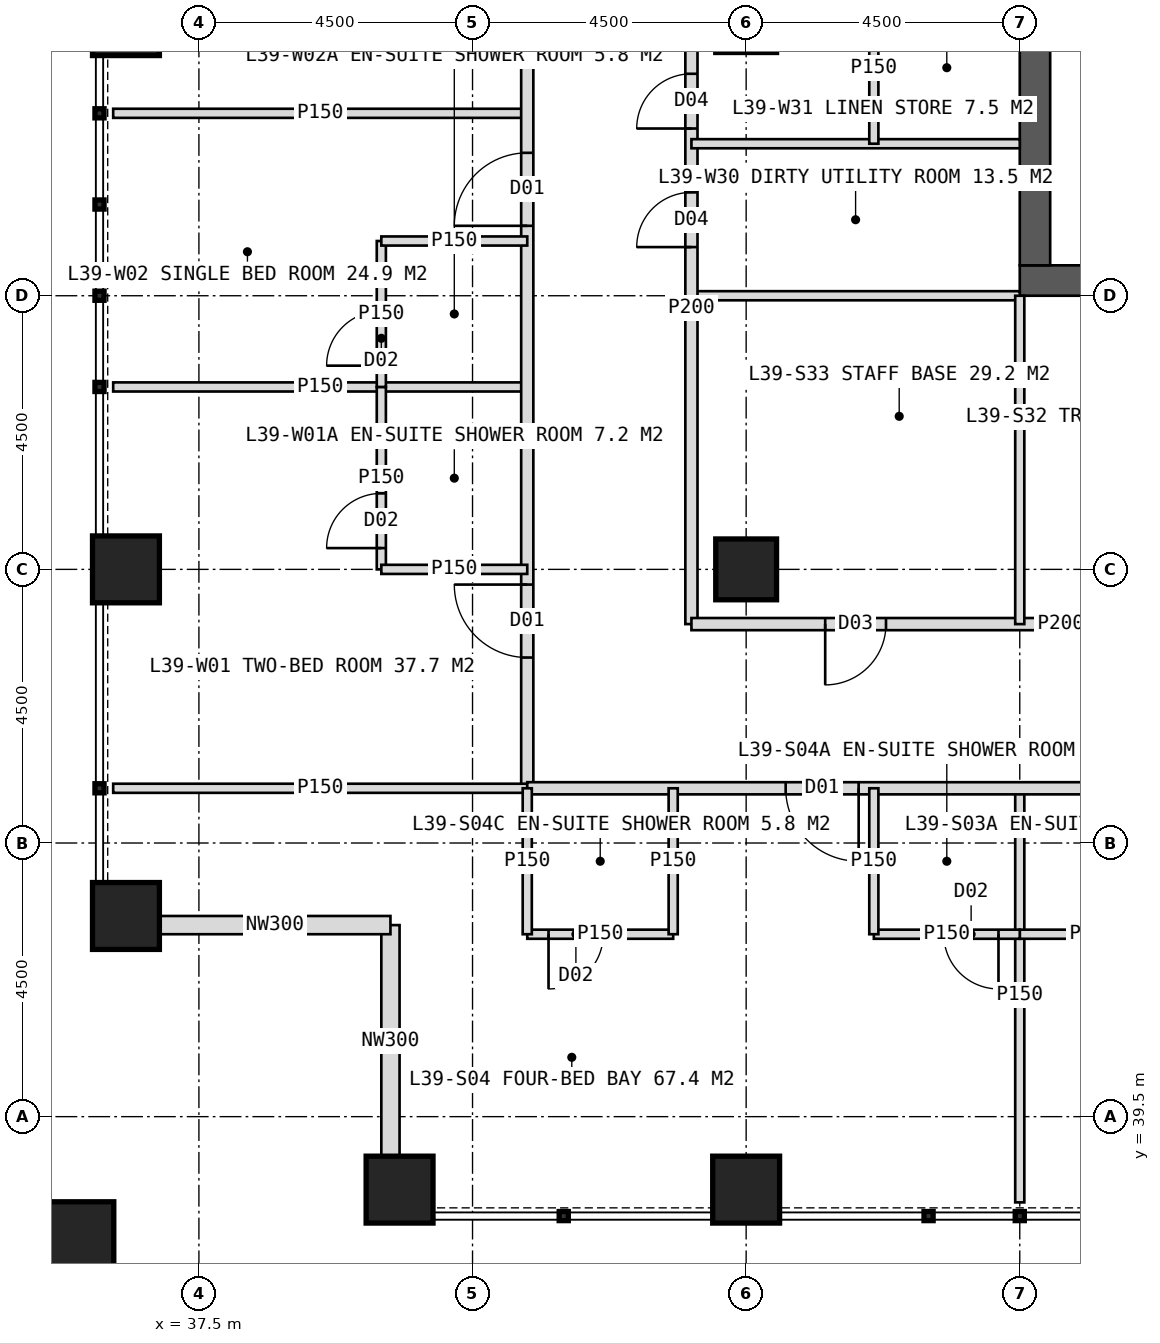
"""IFC4 building model, lengths in metres.
Left out: names, types, materials, properties, quantities, classifications, styles, units other than length and angle.
Written with IfcOpenShell. Run it as: python <this file> out.ifc"""

import sys

from ifc_helpers import new_model, si_unit, direction, frame, frame_2d, origin, origin_2d, place, context, subcontext, project, spatial, rectangle, hollow_rectangle, extrude, element, fill, save


model = new_model("IFC4")
c1 = context("Model", 3, precision=1e-05, world=origin(), true_north=direction((0.0, 1.0)))
c2 = subcontext(c1, "Body", "Model", "MODEL_VIEW")
j1 = project(units=[si_unit("LENGTHUNIT", "METRE"), si_unit("PLANEANGLEUNIT", "RADIAN")], contexts=[c1])
p1 = place(None, origin())
s1 = spatial("IfcSite", under=j1, at=p1, CompositionType="ELEMENT")
p2 = place(p1, origin())
s2 = spatial("IfcBuilding", under=s1, at=p2, CompositionType="ELEMENT")
p3 = place(p2, frame((0.0, 0.0, 164.0)))
s3 = spatial("IfcBuildingStorey", under=s2, at=p3, CompositionType="ELEMENT", Elevation=164.0)
p4 = place(p3, frame((51.0, 53.25, 0.0), z_axis=(0.0, 0.0, 1.0), x_axis=(1.0, 0.0, 0.0)))
e1 = element("IfcWall", 1, at=p4, inside=s3, PredefinedType="SHEAR", context=c2, shape_type="SweptSolid", body=[
    extrude(rectangle(XDim=18.0, YDim=0.5, at=frame_2d((9.0, 0.0))), origin(), (0.0, 0.0, 1.0), 4.0),
])
p5 = place(p4, frame((8.1, 0.0, 0.0)))
e2 = element("IfcOpeningElement", 2, at=p5, cuts=e1, PredefinedType="OPENING", context=c2, shape_type="SweptSolid", body=[
    extrude(rectangle(XDim=1.8, YDim=2.2, at=frame_2d((0.9, 1.1))), frame((0.0, 0.26, 0.0), z_axis=(0.0, -1.0, 0.0), x_axis=(1.0, 0.0, 0.0)), (0.0, 0.0, 1.0), 0.52),
])
p6 = place(p3, frame((51.25, 53.5, 0.0), z_axis=(0.0, 0.0, 1.0), x_axis=(0.0, 1.0, 0.0)))
e3 = element("IfcWall", 3, at=p6, inside=s3, PredefinedType="SHEAR", context=c2, shape_type="SweptSolid", body=[
    extrude(rectangle(XDim=17.0, YDim=0.5, at=frame_2d((8.5, 0.0))), origin(), (0.0, 0.0, 1.0), 4.0),
])
p7 = place(p6, frame((6.0, 0.0, 0.0)))
e4 = element("IfcOpeningElement", 4, at=p7, cuts=e3, PredefinedType="OPENING", context=c2, shape_type="SweptSolid", body=[
    extrude(rectangle(XDim=1.5, YDim=2.2, at=frame_2d((0.75, 1.1))), frame((0.0, 0.26, 0.0), z_axis=(0.0, -1.0, 0.0), x_axis=(1.0, 0.0, 0.0)), (0.0, 0.0, 1.0), 0.52),
])
p8 = place(p3, frame((46.5, 48.5, 0.0), z_axis=(0.0, 0.0, 1.0), x_axis=(1.0, 0.0, 0.0)))
e5 = element("IfcColumn", 5, at=p8, inside=s3, PredefinedType="COLUMN", context=c2, shape_type="SweptSolid", body=[
    extrude(hollow_rectangle(XDim=1.0, YDim=1.0, WallThickness=0.1, at=origin_2d()), origin(), (0.0, 0.0, 1.0), 4.0),
])
for number, where, z_axis, x_axis in (
    (6, (40.8, 38.3, 0.0), (0.0, 0.0, 1.0), (1.0, 0.0, 0.0)),
    (7, (36.3, 42.8, 0.0), (0.0, 0.0, 1.0), (1.0, 0.0, 0.0)),
    (8, (46.5, 38.3, 0.0), (0.0, 0.0, 1.0), (1.0, 0.0, 0.0)),
    (9, (36.3, 48.5, 0.0), (0.0, 0.0, 1.0), (1.0, 0.0, 0.0)),
    (10, (36.3, 57.5, 0.0), (0.0, 0.0, 1.0), (1.0, 0.0, 0.0)),
):
    element("IfcColumn", number, at=place(p3, frame(where, z_axis=z_axis, x_axis=x_axis)), inside=s3, PredefinedType="COLUMN", context=c2, shape_type="SweptSolid", body=[
        extrude(hollow_rectangle(XDim=1.1, YDim=1.1, WallThickness=0.1, at=origin_2d()), origin(), (0.0, 0.0, 1.0), 4.0),
    ])
p9 = place(p3, frame((35.4, 37.4, 0.0), z_axis=(0.0, 0.0, 1.0), x_axis=(1.0, 0.0, 0.0)))
e11 = element("IfcColumn", 11, at=p9, inside=s3, PredefinedType="COLUMN", context=c2, shape_type="SweptSolid", body=[
    extrude(hollow_rectangle(XDim=1.4, YDim=1.4, WallThickness=0.08, at=origin_2d()), origin(), (0.0, 0.0, 1.0), 4.0),
])
for number, where, z_axis, x_axis in (
    (12, (40.65, 38.85, 0.0), (0.0, 0.0, 1.0), (0.0, 1.0, 0.0)),
    (13, (40.65, 42.65, 0.0), (0.0, 0.0, 1.0), (-1.0, 0.0, 0.0)),
):
    element("IfcWall", number, at=place(p3, frame(where, z_axis=z_axis, x_axis=x_axis)), inside=s3, PredefinedType="ELEMENTEDWALL", context=c2, shape_type="SweptSolid", body=[
        extrude(rectangle(XDim=3.8, YDim=0.3, at=frame_2d((1.9, 0.0))), origin(), (0.0, 0.0, 1.0), 4.0),
    ])
for number, where, z_axis, x_axis in (
    (14, (42.9, 51.5, 0.0), (0.0, 0.0, 1.0), (-1.0, 0.0, 0.0)),
    (15, (42.9, 56.0, 0.0), (0.0, 0.0, 1.0), (-1.0, 0.0, 0.0)),
):
    element("IfcWall", number, at=place(p3, frame(where, z_axis=z_axis, x_axis=x_axis)), inside=s3, PredefinedType="PARTITIONING", context=c2, shape_type="SweptSolid", body=[
        extrude(rectangle(XDim=6.81, YDim=0.15, at=frame_2d((3.405, 0.0))), origin(), (0.0, 0.0, 1.0), 3.75),
    ])
p10 = place(p3, frame((42.9, 44.9, 0.0), z_axis=(0.0, 0.0, 1.0), x_axis=(0.0, 1.0, 0.0)))
e16 = element("IfcWall", 16, at=p10, inside=s3, PredefinedType="PARTITIONING", context=c2, shape_type="SweptSolid", body=[
    extrude(rectangle(XDim=34.2, YDim=0.2, at=frame_2d((17.1, 0.0))), origin(), (0.0, 0.0, 1.0), 3.75),
])
p11 = place(p10, frame((2.15, 0.0, 0.0)))
e17 = element("IfcOpeningElement", 17, at=p11, cuts=e16, PredefinedType="OPENING", context=c2, shape_type="SweptSolid", body=[
    extrude(rectangle(XDim=1.2, YDim=2.2, at=frame_2d((0.6, 1.1))), frame((0.0, 0.11, 0.0), z_axis=(0.0, -1.0, 0.0), x_axis=(1.0, 0.0, 0.0)), (0.0, 0.0, 1.0), 0.22),
])
p12 = place(p10, frame((9.25, 0.0, 0.0)))
e18 = element("IfcOpeningElement", 18, at=p12, cuts=e16, PredefinedType="OPENING", context=c2, shape_type="SweptSolid", body=[
    extrude(rectangle(XDim=1.2, YDim=2.2, at=frame_2d((0.6, 1.1))), frame((0.0, 0.11, 0.0), z_axis=(0.0, -1.0, 0.0), x_axis=(1.0, 0.0, 0.0)), (0.0, 0.0, 1.0), 0.22),
])
p13 = place(p10, frame((13.25, 0.0, 0.0)))
e19 = element("IfcOpeningElement", 19, at=p13, cuts=e16, PredefinedType="OPENING", context=c2, shape_type="SweptSolid", body=[
    extrude(rectangle(XDim=1.2, YDim=2.2, at=frame_2d((0.6, 1.1))), frame((0.0, 0.11, 0.0), z_axis=(0.0, -1.0, 0.0), x_axis=(1.0, 0.0, 0.0)), (0.0, 0.0, 1.0), 0.22),
])
p14 = place(p10, frame((19.75, 0.0, 0.0)))
e20 = element("IfcOpeningElement", 20, at=p14, cuts=e16, PredefinedType="OPENING", context=c2, shape_type="SweptSolid", body=[
    extrude(rectangle(XDim=1.2, YDim=2.2, at=frame_2d((0.6, 1.1))), frame((0.0, 0.11, 0.0), z_axis=(0.0, -1.0, 0.0), x_axis=(1.0, 0.0, 0.0)), (0.0, 0.0, 1.0), 0.22),
])
p15 = place(p10, frame((30.35, 0.0, 0.0)))
e21 = element("IfcOpeningElement", 21, at=p15, cuts=e16, PredefinedType="OPENING", context=c2, shape_type="SweptSolid", body=[
    extrude(rectangle(XDim=1.2, YDim=2.2, at=frame_2d((0.6, 1.1))), frame((0.0, 0.11, 0.0), z_axis=(0.0, -1.0, 0.0), x_axis=(1.0, 0.0, 0.0)), (0.0, 0.0, 1.0), 0.22),
])
p16 = place(p3, frame((42.9, 44.9, 0.0), z_axis=(0.0, 0.0, 1.0), x_axis=(-1.0, 0.0, 0.0)))
e22 = element("IfcWall", 22, at=p16, inside=s3, PredefinedType="PARTITIONING", context=c2, shape_type="SweptSolid", body=[
    extrude(rectangle(XDim=6.81, YDim=0.15, at=frame_2d((3.405, 0.0))), origin(), (0.0, 0.0, 1.0), 3.75),
])
p17 = place(p3, frame((40.5, 48.5, 0.0), z_axis=(0.0, 0.0, 1.0), x_axis=(0.0, 1.0, 0.0)))
e23 = element("IfcWall", 23, at=p17, inside=s3, PredefinedType="PARTITIONING", context=c2, shape_type="SweptSolid", body=[
    extrude(rectangle(XDim=3.0, YDim=0.15, at=frame_2d((1.5, 0.0))), origin(), (0.0, 0.0, 1.0), 3.75),
])
p18 = place(p17, frame((0.35, 0.0, 0.0)))
e24 = element("IfcOpeningElement", 24, at=p18, cuts=e23, PredefinedType="OPENING", context=c2, shape_type="SweptSolid", body=[
    extrude(rectangle(XDim=0.9, YDim=2.1, at=frame_2d((0.45, 1.05))), frame((0.0, 0.085, 0.0), z_axis=(0.0, -1.0, 0.0), x_axis=(1.0, 0.0, 0.0)), (0.0, 0.0, 1.0), 0.17),
])
p19 = place(p3, frame((42.9, 48.5, 0.0), z_axis=(0.0, 0.0, 1.0), x_axis=(-1.0, 0.0, 0.0)))
e25 = element("IfcWall", 25, at=p19, inside=s3, PredefinedType="PARTITIONING", context=c2, shape_type="SweptSolid", body=[
    extrude(rectangle(XDim=2.4, YDim=0.15, at=frame_2d((1.2, 0.0))), origin(), (0.0, 0.0, 1.0), 2.95),
])
p20 = place(p3, frame((40.5, 51.5, 0.0), z_axis=(0.0, 0.0, 1.0), x_axis=(0.0, 1.0, 0.0)))
e26 = element("IfcWall", 26, at=p20, inside=s3, PredefinedType="PARTITIONING", context=c2, shape_type="SweptSolid", body=[
    extrude(rectangle(XDim=2.4, YDim=0.15, at=frame_2d((1.2, 0.0))), origin(), (0.0, 0.0, 1.0), 3.75),
])
p21 = place(p20, frame((0.35, 0.0, 0.0)))
e27 = element("IfcOpeningElement", 27, at=p21, cuts=e26, PredefinedType="OPENING", context=c2, shape_type="SweptSolid", body=[
    extrude(rectangle(XDim=0.9, YDim=2.1, at=frame_2d((0.45, 1.05))), frame((0.0, 0.085, 0.0), z_axis=(0.0, -1.0, 0.0), x_axis=(1.0, 0.0, 0.0)), (0.0, 0.0, 1.0), 0.17),
])
p22 = place(p3, frame((42.9, 53.9, 0.0), z_axis=(0.0, 0.0, 1.0), x_axis=(-1.0, 0.0, 0.0)))
e28 = element("IfcWall", 28, at=p22, inside=s3, PredefinedType="PARTITIONING", context=c2, shape_type="SweptSolid", body=[
    extrude(rectangle(XDim=2.4, YDim=0.15, at=frame_2d((1.2, 0.0))), origin(), (0.0, 0.0, 1.0), 3.75),
])
p23 = place(p3, frame((51.0, 53.0, 0.0), z_axis=(0.0, 0.0, 1.0), x_axis=(-1.0, 0.0, 0.0)))
e29 = element("IfcWall", 29, at=p23, inside=s3, PredefinedType="PARTITIONING", context=c2, shape_type="SweptSolid", body=[
    extrude(rectangle(XDim=5.4, YDim=0.15, at=frame_2d((2.7, 0.0))), origin(), (0.0, 0.0, 1.0), 3.75),
])
p24 = place(p3, frame((45.6, 47.6, 0.0), z_axis=(0.0, 0.0, 1.0), x_axis=(0.0, 1.0, 0.0)))
e30 = element("IfcWall", 30, at=p24, inside=s3, PredefinedType="PARTITIONING", context=c2, shape_type="SweptSolid", body=[
    extrude(rectangle(XDim=10.4, YDim=0.2, at=frame_2d((5.2, 0.0))), origin(), (0.0, 0.0, 1.0), 3.75),
])
p25 = place(p24, frame((6.2, 0.0, 0.0)))
e31 = element("IfcOpeningElement", 31, at=p25, cuts=e30, PredefinedType="OPENING", context=c2, shape_type="SweptSolid", body=[
    extrude(rectangle(XDim=0.9, YDim=2.1, at=frame_2d((0.45, 1.05))), frame((0.0, 0.11, 0.0), z_axis=(0.0, -1.0, 0.0), x_axis=(1.0, 0.0, 0.0)), (0.0, 0.0, 1.0), 0.22),
])
p26 = place(p24, frame((8.15, 0.0, 0.0)))
e32 = element("IfcOpeningElement", 32, at=p26, cuts=e30, PredefinedType="OPENING", context=c2, shape_type="SweptSolid", body=[
    extrude(rectangle(XDim=0.9, YDim=2.1, at=frame_2d((0.45, 1.05))), frame((0.0, 0.11, 0.0), z_axis=(0.0, -1.0, 0.0), x_axis=(1.0, 0.0, 0.0)), (0.0, 0.0, 1.0), 0.22),
])
p27 = place(p3, frame((51.0, 55.5, 0.0), z_axis=(0.0, 0.0, 1.0), x_axis=(-1.0, 0.0, 0.0)))
e33 = element("IfcWall", 33, at=p27, inside=s3, PredefinedType="PARTITIONING", context=c2, shape_type="SweptSolid", body=[
    extrude(rectangle(XDim=5.4, YDim=0.15, at=frame_2d((2.7, 0.0))), origin(), (0.0, 0.0, 1.0), 3.75),
])
p28 = place(p3, frame((48.6, 55.5, 0.0), z_axis=(0.0, 0.0, 1.0), x_axis=(0.0, 1.0, 0.0)))
e34 = element("IfcWall", 34, at=p28, inside=s3, PredefinedType="PARTITIONING", context=c2, shape_type="SweptSolid", body=[
    extrude(rectangle(XDim=2.5, YDim=0.15, at=frame_2d((1.25, 0.0))), origin(), (0.0, 0.0, 1.0), 3.75),
])
p29 = place(p3, frame((51.0, 44.9, 0.0), z_axis=(0.0, 0.0, 1.0), x_axis=(0.0, -1.0, 0.0)))
e35 = element("IfcWall", 35, at=p29, inside=s3, PredefinedType="PARTITIONING", context=c2, shape_type="SweptSolid", body=[
    extrude(rectangle(XDim=6.81, YDim=0.15, at=frame_2d((3.405, 0.0))), origin(), (0.0, 0.0, 1.0), 3.75),
])
p30 = place(p3, frame((77.1, 44.9, 0.0), z_axis=(0.0, 0.0, 1.0), x_axis=(-1.0, 0.0, 0.0)))
e36 = element("IfcWall", 36, at=p30, inside=s3, PredefinedType="PARTITIONING", context=c2, shape_type="SweptSolid", body=[
    extrude(rectangle(XDim=34.2, YDim=0.2, at=frame_2d((17.1, 0.0))), origin(), (0.0, 0.0, 1.0), 3.75),
])
p31 = place(p30, frame((4.25, 0.0, 0.0)))
e37 = element("IfcOpeningElement", 37, at=p31, cuts=e36, PredefinedType="OPENING", context=c2, shape_type="SweptSolid", body=[
    extrude(rectangle(XDim=1.2, YDim=2.2, at=frame_2d((0.6, 1.1))), frame((0.0, 0.11, 0.0), z_axis=(0.0, -1.0, 0.0), x_axis=(1.0, 0.0, 0.0)), (0.0, 0.0, 1.0), 0.22),
])
p32 = place(p30, frame((10.75, 0.0, 0.0)))
e38 = element("IfcOpeningElement", 38, at=p32, cuts=e36, PredefinedType="OPENING", context=c2, shape_type="SweptSolid", body=[
    extrude(rectangle(XDim=1.2, YDim=2.2, at=frame_2d((0.6, 1.1))), frame((0.0, 0.11, 0.0), z_axis=(0.0, -1.0, 0.0), x_axis=(1.0, 0.0, 0.0)), (0.0, 0.0, 1.0), 0.22),
])
p33 = place(p30, frame((22.25, 0.0, 0.0)))
e39 = element("IfcOpeningElement", 39, at=p33, cuts=e36, PredefinedType="OPENING", context=c2, shape_type="SweptSolid", body=[
    extrude(rectangle(XDim=1.2, YDim=2.2, at=frame_2d((0.6, 1.1))), frame((0.0, 0.11, 0.0), z_axis=(0.0, -1.0, 0.0), x_axis=(1.0, 0.0, 0.0)), (0.0, 0.0, 1.0), 0.22),
])
p34 = place(p30, frame((28.75, 0.0, 0.0)))
e40 = element("IfcOpeningElement", 40, at=p34, cuts=e36, PredefinedType="OPENING", context=c2, shape_type="SweptSolid", body=[
    extrude(rectangle(XDim=1.2, YDim=2.2, at=frame_2d((0.6, 1.1))), frame((0.0, 0.11, 0.0), z_axis=(0.0, -1.0, 0.0), x_axis=(1.0, 0.0, 0.0)), (0.0, 0.0, 1.0), 0.22),
])
p35 = place(p3, frame((53.4, 42.5, 0.0), z_axis=(0.0, 0.0, 1.0), x_axis=(-1.0, 0.0, 0.0)))
e41 = element("IfcWall", 41, at=p35, inside=s3, PredefinedType="PARTITIONING", context=c2, shape_type="SweptSolid", body=[
    extrude(rectangle(XDim=2.4, YDim=0.15, at=frame_2d((1.2, 0.0))), origin(), (0.0, 0.0, 1.0), 3.75),
])
p36 = place(p35, frame((0.35, 0.0, 0.0)))
e42 = element("IfcOpeningElement", 42, at=p36, cuts=e41, PredefinedType="OPENING", context=c2, shape_type="SweptSolid", body=[
    extrude(rectangle(XDim=0.9, YDim=2.1, at=frame_2d((0.45, 1.05))), frame((0.0, 0.085, 0.0), z_axis=(0.0, -1.0, 0.0), x_axis=(1.0, 0.0, 0.0)), (0.0, 0.0, 1.0), 0.17),
])
p37 = place(p3, frame((51.0, 42.5, 0.0), z_axis=(0.0, 0.0, 1.0), x_axis=(-1.0, 0.0, 0.0)))
e43 = element("IfcWall", 43, at=p37, inside=s3, PredefinedType="PARTITIONING", context=c2, shape_type="SweptSolid", body=[
    extrude(rectangle(XDim=2.4, YDim=0.15, at=frame_2d((1.2, 0.0))), origin(), (0.0, 0.0, 1.0), 3.75),
])
p38 = place(p37, frame((0.35, 0.0, 0.0)))
e44 = element("IfcOpeningElement", 44, at=p38, cuts=e43, PredefinedType="OPENING", context=c2, shape_type="SweptSolid", body=[
    extrude(rectangle(XDim=0.9, YDim=2.1, at=frame_2d((0.45, 1.05))), frame((0.0, 0.085, 0.0), z_axis=(0.0, -1.0, 0.0), x_axis=(1.0, 0.0, 0.0)), (0.0, 0.0, 1.0), 0.17),
])
p39 = place(p3, frame((48.6, 44.9, 0.0), z_axis=(0.0, 0.0, 1.0), x_axis=(0.0, -1.0, 0.0)))
e45 = element("IfcWall", 45, at=p39, inside=s3, PredefinedType="PARTITIONING", context=c2, shape_type="SweptSolid", body=[
    extrude(rectangle(XDim=2.4, YDim=0.15, at=frame_2d((1.2, 0.0))), origin(), (0.0, 0.0, 1.0), 3.75),
])
p40 = place(p3, frame((45.3, 42.5, 0.0), z_axis=(0.0, 0.0, 1.0), x_axis=(-1.0, 0.0, 0.0)))
e46 = element("IfcWall", 46, at=p40, inside=s3, PredefinedType="PARTITIONING", context=c2, shape_type="SweptSolid", body=[
    extrude(rectangle(XDim=2.4, YDim=0.15, at=frame_2d((1.2, 0.0))), origin(), (0.0, 0.0, 1.0), 3.75),
])
p41 = place(p40, frame((1.15, 0.0, 0.0)))
e47 = element("IfcOpeningElement", 47, at=p41, cuts=e46, PredefinedType="OPENING", context=c2, shape_type="SweptSolid", body=[
    extrude(rectangle(XDim=0.9, YDim=2.1, at=frame_2d((0.45, 1.05))), frame((0.0, 0.085, 0.0), z_axis=(0.0, -1.0, 0.0), x_axis=(1.0, 0.0, 0.0)), (0.0, 0.0, 1.0), 0.17),
])
for number, where, z_axis, x_axis in (
    (48, (45.3, 44.9, 0.0), (0.0, 0.0, 1.0), (0.0, -1.0, 0.0)),
    (49, (42.9, 44.9, 0.0), (0.0, 0.0, 1.0), (0.0, -1.0, 0.0)),
):
    element("IfcWall", number, at=place(p3, frame(where, z_axis=z_axis, x_axis=x_axis)), inside=s3, PredefinedType="PARTITIONING", context=c2, shape_type="SweptSolid", body=[
        extrude(rectangle(XDim=2.4, YDim=0.15, at=frame_2d((1.2, 0.0))), origin(), (0.0, 0.0, 1.0), 3.75),
    ])
p42 = place(p3, frame((57.75, 47.6, 0.0), z_axis=(0.0, 0.0, 1.0), x_axis=(-1.0, 0.0, 0.0)))
e50 = element("IfcWall", 50, at=p42, inside=s3, PredefinedType="PARTITIONING", context=c2, shape_type="SweptSolid", body=[
    extrude(rectangle(XDim=12.15, YDim=0.2, at=frame_2d((6.075, 0.0))), origin(), (0.0, 0.0, 1.0), 3.75),
])
p43 = place(p42, frame((4.3, 0.0, 0.0)))
e51 = element("IfcOpeningElement", 51, at=p43, cuts=e50, PredefinedType="OPENING", context=c2, shape_type="SweptSolid", body=[
    extrude(rectangle(XDim=1.0, YDim=2.1, at=frame_2d((0.5, 1.05))), frame((0.0, 0.11, 0.0), z_axis=(0.0, -1.0, 0.0), x_axis=(1.0, 0.0, 0.0)), (0.0, 0.0, 1.0), 0.22),
])
p44 = place(p42, frame((8.95, 0.0, 0.0)))
e52 = element("IfcOpeningElement", 52, at=p44, cuts=e50, PredefinedType="OPENING", context=c2, shape_type="SweptSolid", body=[
    extrude(rectangle(XDim=1.0, YDim=2.1, at=frame_2d((0.5, 1.05))), frame((0.0, 0.11, 0.0), z_axis=(0.0, -1.0, 0.0), x_axis=(1.0, 0.0, 0.0)), (0.0, 0.0, 1.0), 0.22),
])
p45 = place(p3, frame((51.0, 53.0, 0.0), z_axis=(0.0, 0.0, 1.0), x_axis=(0.0, -1.0, 0.0)))
e53 = element("IfcWall", 53, at=p45, inside=s3, PredefinedType="PARTITIONING", context=c2, shape_type="SweptSolid", body=[
    extrude(rectangle(XDim=5.4, YDim=0.15, at=frame_2d((2.7, 0.0))), origin(), (0.0, 0.0, 1.0), 3.75),
])
p46 = place(p11, origin())
e54 = element("IfcDoor", 54, at=p46, inside=s3, OperationType="SINGLE_SWING_RIGHT", PredefinedType="DOOR", context=c2, shape_type="SweptSolid", body=[
    extrude(rectangle(XDim=1.2, YDim=2.2, at=frame_2d((0.6, 1.1))), frame((0.0, 0.025, 0.0), z_axis=(0.0, -1.0, 0.0), x_axis=(1.0, 0.0, 0.0)), (0.0, 0.0, 1.0), 0.05),
])
fill(e17, e54)
p47 = place(p18, origin())
e55 = element("IfcDoor", 55, at=p47, inside=s3, OperationType="SINGLE_SWING_LEFT", PredefinedType="DOOR", context=c2, shape_type="SweptSolid", body=[
    extrude(rectangle(XDim=0.9, YDim=2.1, at=frame_2d((0.45, 1.05))), frame((0.0, 0.025, 0.0), z_axis=(0.0, -1.0, 0.0), x_axis=(1.0, 0.0, 0.0)), (0.0, 0.0, 1.0), 0.05),
])
fill(e24, e55)
p48 = place(p12, origin())
e56 = element("IfcDoor", 56, at=p48, inside=s3, OperationType="SINGLE_SWING_LEFT", PredefinedType="DOOR", context=c2, shape_type="SweptSolid", body=[
    extrude(rectangle(XDim=1.2, YDim=2.2, at=frame_2d((0.6, 1.1))), frame((0.0, 0.025, 0.0), z_axis=(0.0, -1.0, 0.0), x_axis=(1.0, 0.0, 0.0)), (0.0, 0.0, 1.0), 0.05),
])
fill(e18, e56)
p49 = place(p21, origin())
e57 = element("IfcDoor", 57, at=p49, inside=s3, OperationType="SINGLE_SWING_LEFT", PredefinedType="DOOR", context=c2, shape_type="SweptSolid", body=[
    extrude(rectangle(XDim=0.9, YDim=2.1, at=frame_2d((0.45, 1.05))), frame((0.0, 0.025, 0.0), z_axis=(0.0, -1.0, 0.0), x_axis=(1.0, 0.0, 0.0)), (0.0, 0.0, 1.0), 0.05),
])
fill(e27, e57)
p50 = place(p25, origin())
e58 = element("IfcDoor", 58, at=p50, inside=s3, OperationType="SINGLE_SWING_LEFT", PredefinedType="DOOR", context=c2, shape_type="SweptSolid", body=[
    extrude(rectangle(XDim=0.9, YDim=2.1, at=frame_2d((0.45, 1.05))), frame((0.0, 0.025, 0.0), z_axis=(0.0, -1.0, 0.0), x_axis=(1.0, 0.0, 0.0)), (0.0, 0.0, 1.0), 0.05),
])
fill(e31, e58)
p51 = place(p26, origin())
e59 = element("IfcDoor", 59, at=p51, inside=s3, OperationType="SINGLE_SWING_LEFT", PredefinedType="DOOR", context=c2, shape_type="SweptSolid", body=[
    extrude(rectangle(XDim=0.9, YDim=2.1, at=frame_2d((0.45, 1.05))), frame((0.0, 0.025, 0.0), z_axis=(0.0, -1.0, 0.0), x_axis=(1.0, 0.0, 0.0)), (0.0, 0.0, 1.0), 0.05),
])
fill(e32, e59)
p52 = place(p34, origin())
e60 = element("IfcDoor", 60, at=p52, inside=s3, OperationType="SINGLE_SWING_LEFT", PredefinedType="DOOR", context=c2, shape_type="SweptSolid", body=[
    extrude(rectangle(XDim=1.2, YDim=2.2, at=frame_2d((0.6, 1.1))), frame((0.0, 0.025, 0.0), z_axis=(0.0, -1.0, 0.0), x_axis=(1.0, 0.0, 0.0)), (0.0, 0.0, 1.0), 0.05),
])
fill(e40, e60)
p53 = place(p38, origin())
e61 = element("IfcDoor", 61, at=p53, inside=s3, OperationType="SINGLE_SWING_LEFT", PredefinedType="DOOR", context=c2, shape_type="SweptSolid", body=[
    extrude(rectangle(XDim=0.9, YDim=2.1, at=frame_2d((0.45, 1.05))), frame((0.0, 0.025, 0.0), z_axis=(0.0, -1.0, 0.0), x_axis=(1.0, 0.0, 0.0)), (0.0, 0.0, 1.0), 0.05),
])
fill(e44, e61)
p54 = place(p41, origin())
e62 = element("IfcDoor", 62, at=p54, inside=s3, OperationType="SINGLE_SWING_RIGHT", PredefinedType="DOOR", context=c2, shape_type="SweptSolid", body=[
    extrude(rectangle(XDim=0.9, YDim=2.1, at=frame_2d((0.45, 1.05))), frame((0.0, 0.025, 0.0), z_axis=(0.0, -1.0, 0.0), x_axis=(1.0, 0.0, 0.0)), (0.0, 0.0, 1.0), 0.05),
])
fill(e47, e62)
p55 = place(p44, origin())
e63 = element("IfcDoor", 63, at=p55, inside=s3, OperationType="SINGLE_SWING_RIGHT", PredefinedType="DOOR", context=c2, shape_type="SweptSolid", body=[
    extrude(rectangle(XDim=1.0, YDim=2.1, at=frame_2d((0.5, 1.05))), frame((0.0, 0.025, 0.0), z_axis=(0.0, -1.0, 0.0), x_axis=(1.0, 0.0, 0.0)), (0.0, 0.0, 1.0), 0.05),
])
fill(e52, e63)
save(model, sys.argv[1])
